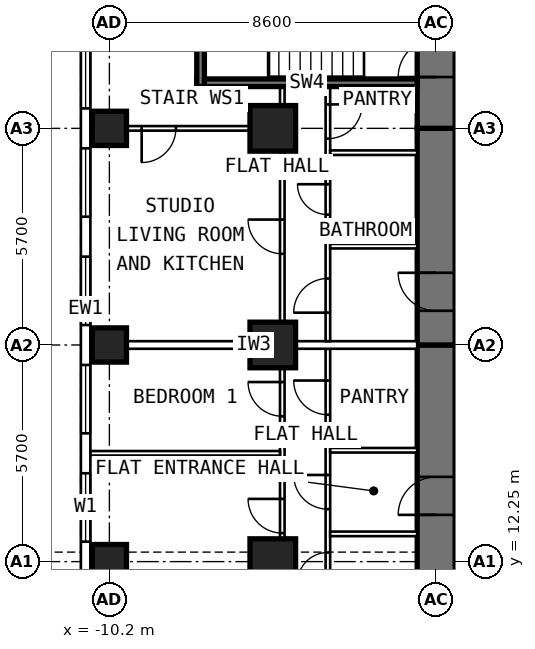
"""IFC4 building model, lengths in metres.
Left out: names, types, materials, properties, quantities, classifications, styles, units other than length and angle.
Written with IfcOpenShell. Run it as: python <this file> out.ifc"""

import sys

from ifc_helpers import new_model, si_unit, direction, frame, frame_2d, origin, origin_2d, place, context, subcontext, project, spatial, rectangle, extrude, element, fill, save


model = new_model("IFC4")
c1 = context("Model", 3, precision=1e-05, world=origin(), true_north=direction((0.0, 1.0)))
c2 = subcontext(c1, "Body", "Model", "MODEL_VIEW")
j1 = project(units=[si_unit("LENGTHUNIT", "METRE"), si_unit("PLANEANGLEUNIT", "RADIAN")], contexts=[c1])
p1 = place(None, origin())
s1 = spatial("IfcSite", under=j1, at=p1, CompositionType="ELEMENT")
p2 = place(p1, origin())
s2 = spatial("IfcBuilding", under=s1, at=p2, CompositionType="ELEMENT")
p3 = place(p2, frame((0.0, 0.0, 84.4)))
s3 = spatial("IfcBuildingStorey", under=s2, at=p3, CompositionType="ELEMENT", Elevation=84.4)
for number, where, z_axis, x_axis in (
    (1, (-10.2, 12.25, 0.0), (0.0, 0.0, 1.0), (0.0, 1.0, 0.0)),
    (2, (-10.2, 17.95, 0.0), (0.0, 0.0, 1.0), (0.0, 1.0, 0.0)),
    (3, (-10.2, 23.65, 0.0), (0.0, 0.0, 1.0), (0.0, 1.0, 0.0)),
):
    element("IfcColumn", number, at=place(p3, frame(where, z_axis=z_axis, x_axis=x_axis)), inside=s3, PredefinedType="COLUMN", context=c2, shape_type="SweptSolid", body=[
        extrude(rectangle(XDim=0.9, YDim=0.9, at=origin_2d()), origin(), (0.0, 0.0, 1.0), 3.6),
    ])
for number, where, z_axis, x_axis in (
    (4, (-5.9, 12.25, 0.0), (0.0, 0.0, 1.0), (0.0, 1.0, 0.0)),
    (5, (-5.9, 17.95, 0.0), (0.0, 0.0, 1.0), (0.0, 1.0, 0.0)),
    (6, (-5.9, 23.65, 0.0), (0.0, 0.0, 1.0), (0.0, 1.0, 0.0)),
):
    element("IfcColumn", number, at=place(p3, frame(where, z_axis=z_axis, x_axis=x_axis)), inside=s3, PredefinedType="COLUMN", context=c2, shape_type="SweptSolid", body=[
        extrude(rectangle(XDim=1.2, YDim=1.2, at=origin_2d()), origin(), (0.0, 0.0, 1.0), 3.6),
    ])
p4 = place(p3, frame((-1.6, 9.6, 0.0), z_axis=(0.0, 0.0, 1.0), x_axis=(0.0, 1.0, 0.0)))
e7 = element("IfcWall", 7, at=p4, inside=s3, PredefinedType="SHEAR", context=c2, shape_type="SweptSolid", body=[
    extrude(rectangle(XDim=8.35, YDim=1.0, at=frame_2d((4.175, 0.0))), origin(), (0.0, 0.0, 1.0), 3.6),
])
p5 = place(p4, frame((3.88, 0.0, 0.0)))
e8 = element("IfcOpeningElement", 8, at=p5, cuts=e7, PredefinedType="OPENING", context=c2, shape_type="SweptSolid", body=[
    extrude(rectangle(XDim=1.0, YDim=2.1, at=frame_2d((0.5, 1.05))), frame((0.0, 0.512, 0.0), z_axis=(0.0, -1.0, 0.0), x_axis=(1.0, 0.0, 0.0)), (0.0, 0.0, 1.0), 1.024),
])
p6 = place(p3, frame((-1.6, 17.95, 0.0), z_axis=(0.0, 0.0, 1.0), x_axis=(0.0, 1.0, 0.0)))
e9 = element("IfcWall", 9, at=p6, inside=s3, PredefinedType="SHEAR", context=c2, shape_type="SweptSolid", body=[
    extrude(rectangle(XDim=5.7, YDim=1.0, at=frame_2d((2.85, 0.0))), origin(), (0.0, 0.0, 1.0), 3.6),
])
p7 = place(p6, frame((0.9, 0.0, 0.0)))
e10 = element("IfcOpeningElement", 10, at=p7, cuts=e9, PredefinedType="OPENING", context=c2, shape_type="SweptSolid", body=[
    extrude(rectangle(XDim=1.0, YDim=2.1, at=frame_2d((0.5, 1.05))), frame((0.0, 0.512, 0.0), z_axis=(0.0, -1.0, 0.0), x_axis=(1.0, 0.0, 0.0)), (0.0, 0.0, 1.0), 1.024),
])
p8 = place(p3, frame((-1.6, 23.65, 0.0), z_axis=(0.0, 0.0, 1.0), x_axis=(0.0, 1.0, 0.0)))
e11 = element("IfcWall", 11, at=p8, inside=s3, PredefinedType="SHEAR", context=c2, shape_type="SweptSolid", body=[
    extrude(rectangle(XDim=10.745, YDim=1.0, at=frame_2d((5.373, 0.0))), origin(), (0.0, 0.0, 1.0), 3.6),
])
p9 = place(p8, frame((1.35, 0.0, 0.0)))
e12 = element("IfcOpeningElement", 12, at=p9, cuts=e11, PredefinedType="OPENING", context=c2, shape_type="SweptSolid", body=[
    extrude(rectangle(XDim=1.0, YDim=2.1, at=frame_2d((0.5, 1.05))), frame((0.0, 0.512, 0.0), z_axis=(0.0, -1.0, 0.0), x_axis=(1.0, 0.0, 0.0)), (0.0, 0.0, 1.0), 1.024),
])
p10 = place(p3, frame((-10.825, 6.148, 0.0), z_axis=(0.0, 0.0, 1.0), x_axis=(0.0, 1.0, 0.0)))
e13 = element("IfcWall", 13, at=p10, inside=s3, PredefinedType="SOLIDWALL", context=c2, shape_type="SweptSolid", body=[
    extrude(rectangle(XDim=25.487, YDim=0.25, at=frame_2d((12.744, 0.0))), origin(), (0.0, 0.0, 1.0), 3.35),
])
p11 = place(p10, frame((0.927, 0.0, 0.8)))
e14 = element("IfcOpeningElement", 14, at=p11, cuts=e13, PredefinedType="OPENING", context=c2, shape_type="SweptSolid", body=[
    extrude(rectangle(XDim=1.8, YDim=1.8, at=frame_2d((0.9, 0.9))), frame((0.0, 0.137, 0.0), z_axis=(0.0, -1.0, 0.0), x_axis=(1.0, 0.0, 0.0)), (0.0, 0.0, 1.0), 0.274),
])
p12 = place(p10, frame((3.777, 0.0, 0.8)))
e15 = element("IfcOpeningElement", 15, at=p12, cuts=e13, PredefinedType="OPENING", context=c2, shape_type="SweptSolid", body=[
    extrude(rectangle(XDim=1.8, YDim=1.8, at=frame_2d((0.9, 0.9))), frame((0.0, 0.137, 0.0), z_axis=(0.0, -1.0, 0.0), x_axis=(1.0, 0.0, 0.0)), (0.0, 0.0, 1.0), 0.274),
])
p13 = place(p10, frame((6.627, 0.0, 0.8)))
e16 = element("IfcOpeningElement", 16, at=p13, cuts=e13, PredefinedType="OPENING", context=c2, shape_type="SweptSolid", body=[
    extrude(rectangle(XDim=1.8, YDim=1.8, at=frame_2d((0.9, 0.9))), frame((0.0, 0.137, 0.0), z_axis=(0.0, -1.0, 0.0), x_axis=(1.0, 0.0, 0.0)), (0.0, 0.0, 1.0), 0.274),
])
p14 = place(p10, frame((9.477, 0.0, 0.8)))
e17 = element("IfcOpeningElement", 17, at=p14, cuts=e13, PredefinedType="OPENING", context=c2, shape_type="SweptSolid", body=[
    extrude(rectangle(XDim=1.8, YDim=1.8, at=frame_2d((0.9, 0.9))), frame((0.0, 0.137, 0.0), z_axis=(0.0, -1.0, 0.0), x_axis=(1.0, 0.0, 0.0)), (0.0, 0.0, 1.0), 0.274),
])
p15 = place(p10, frame((12.327, 0.0, 0.8)))
e18 = element("IfcOpeningElement", 18, at=p15, cuts=e13, PredefinedType="OPENING", context=c2, shape_type="SweptSolid", body=[
    extrude(rectangle(XDim=1.8, YDim=1.8, at=frame_2d((0.9, 0.9))), frame((0.0, 0.137, 0.0), z_axis=(0.0, -1.0, 0.0), x_axis=(1.0, 0.0, 0.0)), (0.0, 0.0, 1.0), 0.274),
])
p16 = place(p10, frame((15.177, 0.0, 0.8)))
e19 = element("IfcOpeningElement", 19, at=p16, cuts=e13, PredefinedType="OPENING", context=c2, shape_type="SweptSolid", body=[
    extrude(rectangle(XDim=1.8, YDim=1.8, at=frame_2d((0.9, 0.9))), frame((0.0, 0.137, 0.0), z_axis=(0.0, -1.0, 0.0), x_axis=(1.0, 0.0, 0.0)), (0.0, 0.0, 1.0), 0.274),
])
p17 = place(p10, frame((18.027, 0.0, 0.8)))
e20 = element("IfcOpeningElement", 20, at=p17, cuts=e13, PredefinedType="OPENING", context=c2, shape_type="SweptSolid", body=[
    extrude(rectangle(XDim=1.8, YDim=1.8, at=frame_2d((0.9, 0.9))), frame((0.0, 0.137, 0.0), z_axis=(0.0, -1.0, 0.0), x_axis=(1.0, 0.0, 0.0)), (0.0, 0.0, 1.0), 0.274),
])
p18 = place(p10, frame((20.877, 0.0, 0.8)))
e21 = element("IfcOpeningElement", 21, at=p18, cuts=e13, PredefinedType="OPENING", context=c2, shape_type="SweptSolid", body=[
    extrude(rectangle(XDim=1.8, YDim=1.8, at=frame_2d((0.9, 0.9))), frame((0.0, 0.137, 0.0), z_axis=(0.0, -1.0, 0.0), x_axis=(1.0, 0.0, 0.0)), (0.0, 0.0, 1.0), 0.274),
])
p19 = place(p3, frame((-4.45, 10.1, 0.0), z_axis=(0.0, 0.0, 1.0), x_axis=(0.0, 1.0, 0.0)))
e22 = element("IfcWall", 22, at=p19, inside=s3, PredefinedType="PARTITIONING", context=c2, shape_type="SweptSolid", body=[
    extrude(rectangle(XDim=7.75, YDim=0.12, at=frame_2d((3.875, 0.0))), origin(), (0.0, 0.0, 1.0), 3.35),
])
p20 = place(p19, frame((1.59, 0.0, 0.0)))
e23 = element("IfcOpeningElement", 23, at=p20, cuts=e22, PredefinedType="OPENING", context=c2, shape_type="SweptSolid", body=[
    extrude(rectangle(XDim=0.8, YDim=2.1, at=frame_2d((0.4, 1.05))), frame((0.0, 0.072, 0.0), z_axis=(0.0, -1.0, 0.0), x_axis=(1.0, 0.0, 0.0)), (0.0, 0.0, 1.0), 0.144),
])
p21 = place(p19, frame((3.53, 0.0, 0.0)))
e24 = element("IfcOpeningElement", 24, at=p21, cuts=e22, PredefinedType="OPENING", context=c2, shape_type="SweptSolid", body=[
    extrude(rectangle(XDim=0.9, YDim=2.1, at=frame_2d((0.45, 1.05))), frame((0.0, 0.072, 0.0), z_axis=(0.0, -1.0, 0.0), x_axis=(1.0, 0.0, 0.0)), (0.0, 0.0, 1.0), 0.144),
])
p22 = place(p19, frame((6.015, 0.0, 0.0)))
e25 = element("IfcOpeningElement", 25, at=p22, cuts=e22, PredefinedType="OPENING", context=c2, shape_type="SweptSolid", body=[
    extrude(rectangle(XDim=0.9, YDim=2.1, at=frame_2d((0.45, 1.05))), frame((0.0, 0.072, 0.0), z_axis=(0.0, -1.0, 0.0), x_axis=(1.0, 0.0, 0.0)), (0.0, 0.0, 1.0), 0.144),
])
p23 = place(p3, frame((-5.65, 9.6, 0.0), z_axis=(0.0, 0.0, 1.0), x_axis=(0.0, 1.0, 0.0)))
e26 = element("IfcWall", 26, at=p23, inside=s3, PredefinedType="PARTITIONING", context=c2, shape_type="SweptSolid", body=[
    extrude(rectangle(XDim=8.1, YDim=0.12, at=frame_2d((4.05, 0.0))), origin(), (0.0, 0.0, 1.0), 3.35),
])
p24 = place(p23, frame((3.4, 0.0, 0.0)))
e27 = element("IfcOpeningElement", 27, at=p24, cuts=e26, PredefinedType="OPENING", context=c2, shape_type="SweptSolid", body=[
    extrude(rectangle(XDim=0.9, YDim=2.1, at=frame_2d((0.45, 1.05))), frame((0.0, 0.072, 0.0), z_axis=(0.0, -1.0, 0.0), x_axis=(1.0, 0.0, 0.0)), (0.0, 0.0, 1.0), 0.144),
])
p25 = place(p23, frame((6.475, 0.0, 0.0)))
e28 = element("IfcOpeningElement", 28, at=p25, cuts=e26, PredefinedType="OPENING", context=c2, shape_type="SweptSolid", body=[
    extrude(rectangle(XDim=0.9, YDim=2.1, at=frame_2d((0.45, 1.05))), frame((0.0, 0.072, 0.0), z_axis=(0.0, -1.0, 0.0), x_axis=(1.0, 0.0, 0.0)), (0.0, 0.0, 1.0), 0.144),
])
p26 = place(p3, frame((-5.71, 15.1, 0.0), z_axis=(0.0, 0.0, 1.0), x_axis=(-1.0, 0.0, 0.0)))
e29 = element("IfcWall", 29, at=p26, inside=s3, PredefinedType="PARTITIONING", context=c2, shape_type="SweptSolid", body=[
    extrude(rectangle(XDim=4.99, YDim=0.12, at=frame_2d((2.495, 0.0))), origin(), (0.0, 0.0, 1.0), 3.35),
])
for number, where, z_axis, x_axis in (
    (30, (-2.1, 12.98, 0.0), (0.0, 0.0, 1.0), (-1.0, 0.0, 0.0)),
    (31, (-2.1, 15.18, 0.0), (0.0, 0.0, 1.0), (-1.0, 0.0, 0.0)),
):
    element("IfcWall", number, at=place(p3, frame(where, z_axis=z_axis, x_axis=x_axis)), inside=s3, PredefinedType="PARTITIONING", context=c2, shape_type="SweptSolid", body=[
        extrude(rectangle(XDim=2.29, YDim=0.12, at=frame_2d((1.145, 0.0))), origin(), (0.0, 0.0, 1.0), 3.35),
    ])
p27 = place(p3, frame((-4.45, 18.05, 0.0), z_axis=(0.0, 0.0, 1.0), x_axis=(0.0, 1.0, 0.0)))
e32 = element("IfcWall", 32, at=p27, inside=s3, PredefinedType="PARTITIONING", context=c2, shape_type="SweptSolid", body=[
    extrude(rectangle(XDim=6.7, YDim=0.12, at=frame_2d((3.35, 0.0))), origin(), (0.0, 0.0, 1.0), 3.35),
])
p28 = place(p27, frame((0.75, 0.0, 0.0)))
e33 = element("IfcOpeningElement", 33, at=p28, cuts=e32, PredefinedType="OPENING", context=c2, shape_type="SweptSolid", body=[
    extrude(rectangle(XDim=0.9, YDim=2.1, at=frame_2d((0.45, 1.05))), frame((0.0, 0.072, 0.0), z_axis=(0.0, -1.0, 0.0), x_axis=(1.0, 0.0, 0.0)), (0.0, 0.0, 1.0), 0.144),
])
p29 = place(p27, frame((3.33, 0.0, 0.0)))
e34 = element("IfcOpeningElement", 34, at=p29, cuts=e32, PredefinedType="OPENING", context=c2, shape_type="SweptSolid", body=[
    extrude(rectangle(XDim=0.8, YDim=2.1, at=frame_2d((0.4, 1.05))), frame((0.0, 0.072, 0.0), z_axis=(0.0, -1.0, 0.0), x_axis=(1.0, 0.0, 0.0)), (0.0, 0.0, 1.0), 0.144),
])
p30 = place(p27, frame((5.33, 0.0, 0.0)))
e35 = element("IfcOpeningElement", 35, at=p30, cuts=e32, PredefinedType="OPENING", context=c2, shape_type="SweptSolid", body=[
    extrude(rectangle(XDim=0.9, YDim=2.1, at=frame_2d((0.45, 1.05))), frame((0.0, 0.072, 0.0), z_axis=(0.0, -1.0, 0.0), x_axis=(1.0, 0.0, 0.0)), (0.0, 0.0, 1.0), 0.144),
])
p31 = place(p3, frame((-5.65, 18.05, 0.0), z_axis=(0.0, 0.0, 1.0), x_axis=(0.0, 1.0, 0.0)))
e36 = element("IfcWall", 36, at=p31, inside=s3, PredefinedType="PARTITIONING", context=c2, shape_type="SweptSolid", body=[
    extrude(rectangle(XDim=6.7, YDim=0.12, at=frame_2d((3.35, 0.0))), origin(), (0.0, 0.0, 1.0), 3.35),
])
p32 = place(p31, frame((2.3, 0.0, 0.0)))
e37 = element("IfcOpeningElement", 37, at=p32, cuts=e36, PredefinedType="OPENING", context=c2, shape_type="SweptSolid", body=[
    extrude(rectangle(XDim=0.9, YDim=2.1, at=frame_2d((0.45, 1.05))), frame((0.0, 0.072, 0.0), z_axis=(0.0, -1.0, 0.0), x_axis=(1.0, 0.0, 0.0)), (0.0, 0.0, 1.0), 0.144),
])
for number, where, z_axis, x_axis in (
    (38, (-2.1, 20.55, 0.0), (0.0, 0.0, 1.0), (-1.0, 0.0, 0.0)),
    (39, (-2.1, 23.01, 0.0), (0.0, 0.0, 1.0), (-1.0, 0.0, 0.0)),
):
    element("IfcWall", number, at=place(p3, frame(where, z_axis=z_axis, x_axis=x_axis)), inside=s3, PredefinedType="PARTITIONING", context=c2, shape_type="SweptSolid", body=[
        extrude(rectangle(XDim=2.29, YDim=0.12, at=frame_2d((1.145, 0.0))), origin(), (0.0, 0.0, 1.0), 3.35),
    ])
p33 = place(p3, frame((-2.1, 17.95, 0.0), z_axis=(0.0, 0.0, 1.0), x_axis=(-1.0, 0.0, 0.0)))
e40 = element("IfcWall", 40, at=p33, inside=s3, PredefinedType="PARTITIONING", context=c2, shape_type="SweptSolid", body=[
    extrude(rectangle(XDim=8.6, YDim=0.2, at=frame_2d((4.3, 0.0))), origin(), (0.0, 0.0, 1.0), 2.45),
])
p34 = place(p3, frame((-5.71, 23.65, 0.0), z_axis=(0.0, 0.0, 1.0), x_axis=(-1.0, 0.0, 0.0)))
e41 = element("IfcWall", 41, at=p34, inside=s3, PredefinedType="PARTITIONING", context=c2, shape_type="SweptSolid", body=[
    extrude(rectangle(XDim=4.99, YDim=0.12, at=frame_2d((2.495, 0.0))), origin(), (0.0, 0.0, 1.0), 2.45),
])
p35 = place(p34, frame((2.74, 0.0, 0.0)))
e42 = element("IfcOpeningElement", 42, at=p35, cuts=e41, PredefinedType="OPENING", context=c2, shape_type="SweptSolid", body=[
    extrude(rectangle(XDim=0.9, YDim=2.1, at=frame_2d((0.45, 1.05))), frame((0.0, 0.072, 0.0), z_axis=(0.0, -1.0, 0.0), x_axis=(1.0, 0.0, 0.0)), (0.0, 0.0, 1.0), 0.144),
])
p36 = place(p3, frame((-2.1, 24.85, 0.0), z_axis=(0.0, 0.0, 1.0), x_axis=(-1.0, 0.0, 0.0)))
e43 = element("IfcWall", 43, at=p36, inside=s3, PredefinedType="SHEAR", context=c2, shape_type="SweptSolid", body=[
    extrude(rectangle(XDim=5.8, YDim=0.2, at=frame_2d((2.9, 0.0))), origin(), (0.0, 0.0, 1.0), 3.33),
])
p37 = place(p3, frame((-7.8, 24.75, 0.0), z_axis=(0.0, 0.0, 1.0), x_axis=(0.0, 1.0, 0.0)))
e44 = element("IfcWall", 44, at=p37, inside=s3, PredefinedType="SHEAR", context=c2, shape_type="SweptSolid", body=[
    extrude(rectangle(XDim=4.0, YDim=0.2, at=frame_2d((2.0, 0.0))), origin(), (0.0, 0.0, 1.0), 3.33),
])
p38 = place(p13, origin())
e45 = element("IfcWindow", 45, at=p38, inside=s3, PartitioningType="SINGLE_PANEL", PredefinedType="WINDOW", context=c2, shape_type="SweptSolid", body=[
    extrude(rectangle(XDim=1.8, YDim=1.8, at=frame_2d((0.9, 0.9))), frame((0.0, 0.03, 0.0), z_axis=(0.0, -1.0, 0.0), x_axis=(1.0, 0.0, 0.0)), (0.0, 0.0, 1.0), 0.06),
])
fill(e16, e45)
p39 = place(p14, origin())
e46 = element("IfcWindow", 46, at=p39, inside=s3, PartitioningType="SINGLE_PANEL", PredefinedType="WINDOW", context=c2, shape_type="SweptSolid", body=[
    extrude(rectangle(XDim=1.8, YDim=1.8, at=frame_2d((0.9, 0.9))), frame((0.0, 0.03, 0.0), z_axis=(0.0, -1.0, 0.0), x_axis=(1.0, 0.0, 0.0)), (0.0, 0.0, 1.0), 0.06),
])
fill(e17, e46)
p40 = place(p15, origin())
e47 = element("IfcWindow", 47, at=p40, inside=s3, PartitioningType="SINGLE_PANEL", PredefinedType="WINDOW", context=c2, shape_type="SweptSolid", body=[
    extrude(rectangle(XDim=1.8, YDim=1.8, at=frame_2d((0.9, 0.9))), frame((0.0, 0.03, 0.0), z_axis=(0.0, -1.0, 0.0), x_axis=(1.0, 0.0, 0.0)), (0.0, 0.0, 1.0), 0.06),
])
fill(e18, e47)
p41 = place(p16, origin())
e48 = element("IfcWindow", 48, at=p41, inside=s3, PartitioningType="SINGLE_PANEL", PredefinedType="WINDOW", context=c2, shape_type="SweptSolid", body=[
    extrude(rectangle(XDim=1.8, YDim=1.8, at=frame_2d((0.9, 0.9))), frame((0.0, 0.03, 0.0), z_axis=(0.0, -1.0, 0.0), x_axis=(1.0, 0.0, 0.0)), (0.0, 0.0, 1.0), 0.06),
])
fill(e19, e48)
p42 = place(p17, origin())
e49 = element("IfcWindow", 49, at=p42, inside=s3, PartitioningType="SINGLE_PANEL", PredefinedType="WINDOW", context=c2, shape_type="SweptSolid", body=[
    extrude(rectangle(XDim=1.8, YDim=1.8, at=frame_2d((0.9, 0.9))), frame((0.0, 0.03, 0.0), z_axis=(0.0, -1.0, 0.0), x_axis=(1.0, 0.0, 0.0)), (0.0, 0.0, 1.0), 0.06),
])
fill(e20, e49)
p43 = place(p5, origin())
e50 = element("IfcDoor", 50, at=p43, inside=s3, OperationType="SINGLE_SWING_LEFT", PredefinedType="DOOR", context=c2, shape_type="SweptSolid", body=[
    extrude(rectangle(XDim=1.0, YDim=2.1, at=frame_2d((0.5, 1.05))), frame((0.0, 0.25, 0.0), z_axis=(0.0, -1.0, 0.0), x_axis=(1.0, 0.0, 0.0)), (0.0, 0.0, 1.0), 0.5),
])
fill(e8, e50)
p44 = place(p24, origin())
e51 = element("IfcDoor", 51, at=p44, inside=s3, OperationType="SINGLE_SWING_RIGHT", PredefinedType="DOOR", context=c2, shape_type="SweptSolid", body=[
    extrude(rectangle(XDim=0.9, YDim=2.1, at=frame_2d((0.45, 1.05))), frame((0.0, 0.025, 0.0), z_axis=(0.0, -1.0, 0.0), x_axis=(1.0, 0.0, 0.0)), (0.0, 0.0, 1.0), 0.05),
])
fill(e27, e51)
p45 = place(p25, origin())
e52 = element("IfcDoor", 52, at=p45, inside=s3, OperationType="SINGLE_SWING_RIGHT", PredefinedType="DOOR", context=c2, shape_type="SweptSolid", body=[
    extrude(rectangle(XDim=0.9, YDim=2.1, at=frame_2d((0.45, 1.05))), frame((0.0, 0.025, 0.0), z_axis=(0.0, -1.0, 0.0), x_axis=(1.0, 0.0, 0.0)), (0.0, 0.0, 1.0), 0.05),
])
fill(e28, e52)
p46 = place(p20, origin())
e53 = element("IfcDoor", 53, at=p46, inside=s3, OperationType="SINGLE_SWING_LEFT", PredefinedType="DOOR", context=c2, shape_type="SweptSolid", body=[
    extrude(rectangle(XDim=0.8, YDim=2.1, at=frame_2d((0.4, 1.05))), frame((0.0, 0.025, 0.0), z_axis=(0.0, -1.0, 0.0), x_axis=(1.0, 0.0, 0.0)), (0.0, 0.0, 1.0), 0.05),
])
fill(e23, e53)
p47 = place(p21, origin())
e54 = element("IfcDoor", 54, at=p47, inside=s3, OperationType="SINGLE_SWING_RIGHT", PredefinedType="DOOR", context=c2, shape_type="SweptSolid", body=[
    extrude(rectangle(XDim=0.9, YDim=2.1, at=frame_2d((0.45, 1.05))), frame((0.0, 0.025, 0.0), z_axis=(0.0, -1.0, 0.0), x_axis=(1.0, 0.0, 0.0)), (0.0, 0.0, 1.0), 0.05),
])
fill(e24, e54)
p48 = place(p22, origin())
e55 = element("IfcDoor", 55, at=p48, inside=s3, OperationType="SINGLE_SWING_RIGHT", PredefinedType="DOOR", context=c2, shape_type="SweptSolid", body=[
    extrude(rectangle(XDim=0.9, YDim=2.1, at=frame_2d((0.45, 1.05))), frame((0.0, 0.025, 0.0), z_axis=(0.0, -1.0, 0.0), x_axis=(1.0, 0.0, 0.0)), (0.0, 0.0, 1.0), 0.05),
])
fill(e25, e55)
p49 = place(p7, origin())
e56 = element("IfcDoor", 56, at=p49, inside=s3, OperationType="SINGLE_SWING_RIGHT", PredefinedType="DOOR", context=c2, shape_type="SweptSolid", body=[
    extrude(rectangle(XDim=1.0, YDim=2.1, at=frame_2d((0.5, 1.05))), frame((0.0, 0.25, 0.0), z_axis=(0.0, -1.0, 0.0), x_axis=(1.0, 0.0, 0.0)), (0.0, 0.0, 1.0), 0.5),
])
fill(e10, e56)
p50 = place(p32, origin())
e57 = element("IfcDoor", 57, at=p50, inside=s3, OperationType="SINGLE_SWING_RIGHT", PredefinedType="DOOR", context=c2, shape_type="SweptSolid", body=[
    extrude(rectangle(XDim=0.9, YDim=2.1, at=frame_2d((0.45, 1.05))), frame((0.0, 0.025, 0.0), z_axis=(0.0, -1.0, 0.0), x_axis=(1.0, 0.0, 0.0)), (0.0, 0.0, 1.0), 0.05),
])
fill(e37, e57)
p51 = place(p28, origin())
e58 = element("IfcDoor", 58, at=p51, inside=s3, OperationType="SINGLE_SWING_LEFT", PredefinedType="DOOR", context=c2, shape_type="SweptSolid", body=[
    extrude(rectangle(XDim=0.9, YDim=2.1, at=frame_2d((0.45, 1.05))), frame((0.0, 0.025, 0.0), z_axis=(0.0, -1.0, 0.0), x_axis=(1.0, 0.0, 0.0)), (0.0, 0.0, 1.0), 0.05),
])
fill(e33, e58)
p52 = place(p29, origin())
e59 = element("IfcDoor", 59, at=p52, inside=s3, OperationType="SINGLE_SWING_RIGHT", PredefinedType="DOOR", context=c2, shape_type="SweptSolid", body=[
    extrude(rectangle(XDim=0.8, YDim=2.1, at=frame_2d((0.4, 1.05))), frame((0.0, 0.025, 0.0), z_axis=(0.0, -1.0, 0.0), x_axis=(1.0, 0.0, 0.0)), (0.0, 0.0, 1.0), 0.05),
])
fill(e34, e59)
p53 = place(p30, frame((0.9, 0.0, 0.0), z_axis=(0.0, 0.0, 1.0), x_axis=(-1.0, 0.0, 0.0)))
e60 = element("IfcDoor", 60, at=p53, inside=s3, OperationType="SINGLE_SWING_LEFT", PredefinedType="DOOR", context=c2, shape_type="SweptSolid", body=[
    extrude(rectangle(XDim=0.9, YDim=2.1, at=frame_2d((0.45, 1.05))), frame((0.0, 0.025, 0.0), z_axis=(0.0, -1.0, 0.0), x_axis=(1.0, 0.0, 0.0)), (0.0, 0.0, 1.0), 0.05),
])
fill(e35, e60)
p54 = place(p35, origin())
e61 = element("IfcDoor", 61, at=p54, inside=s3, OperationType="SINGLE_SWING_RIGHT", PredefinedType="DOOR", context=c2, shape_type="SweptSolid", body=[
    extrude(rectangle(XDim=0.9, YDim=2.1, at=frame_2d((0.45, 1.05))), frame((0.0, 0.025, 0.0), z_axis=(0.0, -1.0, 0.0), x_axis=(1.0, 0.0, 0.0)), (0.0, 0.0, 1.0), 0.05),
])
fill(e42, e61)
p55 = place(p9, origin())
e62 = element("IfcDoor", 62, at=p55, inside=s3, OperationType="SINGLE_SWING_LEFT", PredefinedType="DOOR", context=c2, shape_type="SweptSolid", body=[
    extrude(rectangle(XDim=1.0, YDim=2.1, at=frame_2d((0.5, 1.05))), frame((0.0, 0.25, 0.0), z_axis=(0.0, -1.0, 0.0), x_axis=(1.0, 0.0, 0.0)), (0.0, 0.0, 1.0), 0.5),
])
fill(e12, e62)
save(model, sys.argv[1])
